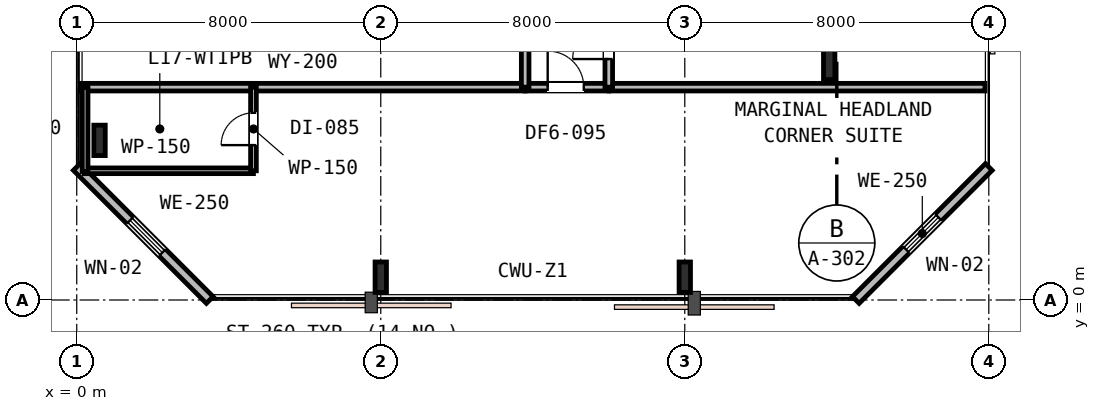
"""IFC4 building model, lengths in metres.
Left out: names, types, materials, properties, quantities, classifications, styles, units other than length and angle.
Written with IfcOpenShell. Run it as: python <this file> out.ifc"""

import sys

from ifc_helpers import new_model, si_unit, direction, frame, frame_2d, origin, origin_2d, place, context, subcontext, project, spatial, rectangle, i_section, extrude, element, fill, save


model = new_model("IFC4")
c1 = context("Model", 3, precision=1e-05, world=origin(), true_north=direction((0.0, 1.0)))
c2 = subcontext(c1, "Body", "Model", "MODEL_VIEW")
j1 = project(units=[si_unit("LENGTHUNIT", "METRE"), si_unit("PLANEANGLEUNIT", "RADIAN")], contexts=[c1])
p1 = place(None, origin())
s1 = spatial("IfcSite", under=j1, at=p1, CompositionType="ELEMENT")
p2 = place(p1, origin())
s2 = spatial("IfcBuilding", under=s1, at=p2, CompositionType="ELEMENT")
p3 = place(p2, frame((0.0, 0.0, 69.0)))
s3 = spatial("IfcBuildingStorey", under=s2, at=p3, CompositionType="ELEMENT", Elevation=69.0)
for number, where, z_axis, x_axis in (
    (1, (0.6, 4.2, 0.0), (0.0, 0.0, 1.0), (1.0, 0.0, 0.0)),
    (2, (8.0, 0.6, 0.0), (0.0, 0.0, 1.0), (1.0, 0.0, 0.0)),
    (3, (16.0, 0.6, 0.0), (0.0, 0.0, 1.0), (1.0, 0.0, 0.0)),
    (4, (19.8, 6.2, 0.0), (0.0, 0.0, 1.0), (1.0, 0.0, 0.0)),
):
    element("IfcColumn", number, at=place(p3, frame(where, z_axis=z_axis, x_axis=x_axis)), inside=s3, PredefinedType="COLUMN", context=c2, shape_type="SweptSolid", body=[
        extrude(i_section(OverallWidth=0.3, OverallDepth=0.8, WebThickness=0.018, FlangeThickness=0.033, FilletRadius=0.03, at=origin_2d()), origin(), (0.0, 0.0, 1.0), 3.6),
    ])
p4 = place(p3, frame((20.5, 0.0, 0.0), z_axis=(0.0, 0.0, 1.0), x_axis=(0.707106781187, 0.707106781187, 0.0)))
e5 = element("IfcWall", 5, at=p4, inside=s3, PredefinedType="STANDARD", context=c2, shape_type="SweptSolid", body=[
    extrude(rectangle(XDim=4.95, YDim=0.25, at=frame_2d((2.475, 0.0))), origin(), (0.0, 0.0, 1.0), 3.33),
])
p5 = place(p4, frame((1.875, 0.0, 0.85)))
e6 = element("IfcOpeningElement", 6, at=p5, cuts=e5, PredefinedType="OPENING", context=c2, shape_type="SweptSolid", body=[
    extrude(rectangle(XDim=1.2, YDim=1.6, at=frame_2d((0.6, 0.8))), frame((0.0, 0.135, 0.0), z_axis=(0.0, -1.0, 0.0), x_axis=(1.0, 0.0, 0.0)), (0.0, 0.0, 1.0), 0.27),
])
p6 = place(p3, frame((0.0, 3.5, 0.0), z_axis=(0.0, 0.0, 1.0), x_axis=(0.707106781187, -0.707106781187, 0.0)))
e7 = element("IfcWall", 7, at=p6, inside=s3, PredefinedType="STANDARD", context=c2, shape_type="SweptSolid", body=[
    extrude(rectangle(XDim=4.95, YDim=0.25, at=frame_2d((2.475, 0.0))), origin(), (0.0, 0.0, 1.0), 3.33),
])
p7 = place(p6, frame((1.985, 0.0, 0.85)))
e8 = element("IfcOpeningElement", 8, at=p7, cuts=e7, PredefinedType="OPENING", context=c2, shape_type="SweptSolid", body=[
    extrude(rectangle(XDim=1.2, YDim=1.6, at=frame_2d((0.6, 0.8))), frame((0.0, 0.135, 0.0), z_axis=(0.0, -1.0, 0.0), x_axis=(1.0, 0.0, 0.0)), (0.0, 0.0, 1.0), 0.27),
])
p8 = place(p3, frame((0.1, 5.6, 0.0), z_axis=(0.0, 0.0, 1.0), x_axis=(1.0, 0.0, 0.0)))
e9 = element("IfcWall", 9, at=p8, inside=s3, PredefinedType="PARTITIONING", context=c2, shape_type="SweptSolid", body=[
    extrude(rectangle(XDim=11.7, YDim=0.2, at=frame_2d((5.85, 0.0))), origin(), (0.0, 0.0, 1.0), 2.92),
])
p9 = place(p3, frame((14.0, 5.6, 0.0), z_axis=(0.0, 0.0, 1.0), x_axis=(1.0, 0.0, 0.0)))
e10 = element("IfcWall", 10, at=p9, inside=s3, PredefinedType="PARTITIONING", context=c2, shape_type="SweptSolid", body=[
    extrude(rectangle(XDim=9.9, YDim=0.2, at=frame_2d((4.95, 0.0))), origin(), (0.0, 0.0, 1.0), 2.83),
])
p10 = place(p3, frame((11.8, 5.6, 0.0), z_axis=(0.0, 0.0, 1.0), x_axis=(1.0, 0.0, 0.0)))
e11 = element("IfcWall", 11, at=p10, inside=s3, PredefinedType="PARTITIONING", context=c2, shape_type="SweptSolid", body=[
    extrude(rectangle(XDim=2.2, YDim=0.2, at=frame_2d((1.1, 0.0))), origin(), (0.0, 0.0, 1.0), 3.33),
])
p11 = place(p10, frame((0.593, 0.0, 0.0)))
e12 = element("IfcOpeningElement", 12, at=p11, cuts=e11, PredefinedType="OPENING", context=c2, shape_type="SweptSolid", body=[
    extrude(rectangle(XDim=0.95, YDim=2.15, at=frame_2d((0.475, 1.075))), frame((0.0, 0.11, 0.0), z_axis=(0.0, -1.0, 0.0), x_axis=(1.0, 0.0, 0.0)), (0.0, 0.0, 1.0), 0.22),
])
p12 = place(p3, frame((0.2, 3.4, 0.0), z_axis=(0.0, 0.0, 1.0), x_axis=(1.0, 0.0, 0.0)))
e13 = element("IfcWall", 13, at=p12, inside=s3, PredefinedType="PARTITIONING", context=c2, shape_type="SweptSolid", body=[
    extrude(rectangle(XDim=4.45, YDim=0.15, at=frame_2d((2.225, 0.0))), origin(), (0.0, 0.0, 1.0), 3.33),
])
p13 = place(p3, frame((4.65, 3.4, 0.0), z_axis=(0.0, 0.0, 1.0), x_axis=(0.0, 1.0, 0.0)))
e14 = element("IfcWall", 14, at=p13, inside=s3, PredefinedType="PARTITIONING", context=c2, shape_type="SweptSolid", body=[
    extrude(rectangle(XDim=2.2, YDim=0.15, at=frame_2d((1.1, 0.0))), origin(), (0.0, 0.0, 1.0), 3.33),
])
p14 = place(p13, frame((0.675, 0.0, 0.0)))
e15 = element("IfcOpeningElement", 15, at=p14, cuts=e14, PredefinedType="OPENING", context=c2, shape_type="SweptSolid", body=[
    extrude(rectangle(XDim=0.85, YDim=2.15, at=frame_2d((0.425, 1.075))), frame((0.0, 0.085, 0.0), z_axis=(0.0, -1.0, 0.0), x_axis=(1.0, 0.0, 0.0)), (0.0, 0.0, 1.0), 0.17),
])
p15 = place(p3, frame((0.22, 3.38, 0.0), z_axis=(0.0, 0.0, 1.0), x_axis=(0.0, 1.0, 0.0)))
e16 = element("IfcWall", 16, at=p15, inside=s3, PredefinedType="PARTITIONING", context=c2, shape_type="SweptSolid", body=[
    extrude(rectangle(XDim=2.22, YDim=0.15, at=frame_2d((1.11, 0.0))), origin(), (0.0, 0.0, 1.0), 2.92),
])
p16 = place(p3, frame((11.8, 5.6, 0.0), z_axis=(0.0, 0.0, 1.0), x_axis=(0.0, 1.0, 0.0)))
e17 = element("IfcWall", 17, at=p16, inside=s3, PredefinedType="PARTITIONING", context=c2, shape_type="SweptSolid", body=[
    extrude(rectangle(XDim=23.0, YDim=0.2, at=frame_2d((11.5, 0.0))), origin(), (0.0, 0.0, 1.0), 2.83),
])
p17 = place(p16, frame((1.2, 0.0, 0.0)))
e18 = element("IfcOpeningElement", 18, at=p17, cuts=e17, PredefinedType="OPENING", context=c2, shape_type="SweptSolid", body=[
    extrude(rectangle(XDim=0.95, YDim=2.15, at=frame_2d((0.475, 1.075))), frame((0.0, 0.11, 0.0), z_axis=(0.0, -1.0, 0.0), x_axis=(1.0, 0.0, 0.0)), (0.0, 0.0, 1.0), 0.22),
])
p18 = place(p16, frame((7.0, 0.0, 0.0)))
e19 = element("IfcOpeningElement", 19, at=p18, cuts=e17, PredefinedType="OPENING", context=c2, shape_type="SweptSolid", body=[
    extrude(rectangle(XDim=0.95, YDim=2.15, at=frame_2d((0.475, 1.075))), frame((0.0, 0.11, 0.0), z_axis=(0.0, -1.0, 0.0), x_axis=(1.0, 0.0, 0.0)), (0.0, 0.0, 1.0), 0.22),
])
p19 = place(p16, frame((12.8, 0.0, 0.0)))
e20 = element("IfcOpeningElement", 20, at=p19, cuts=e17, PredefinedType="OPENING", context=c2, shape_type="SweptSolid", body=[
    extrude(rectangle(XDim=0.95, YDim=2.15, at=frame_2d((0.475, 1.075))), frame((0.0, 0.11, 0.0), z_axis=(0.0, -1.0, 0.0), x_axis=(1.0, 0.0, 0.0)), (0.0, 0.0, 1.0), 0.22),
])
p20 = place(p16, frame((18.515, 0.0, 0.0)))
e21 = element("IfcOpeningElement", 21, at=p20, cuts=e17, PredefinedType="OPENING", context=c2, shape_type="SweptSolid", body=[
    extrude(rectangle(XDim=0.95, YDim=2.15, at=frame_2d((0.475, 1.075))), frame((0.0, 0.11, 0.0), z_axis=(0.0, -1.0, 0.0), x_axis=(1.0, 0.0, 0.0)), (0.0, 0.0, 1.0), 0.22),
])
p21 = place(p3, frame((14.0, 5.6, 0.0), z_axis=(0.0, 0.0, 1.0), x_axis=(0.0, 1.0, 0.0)))
e22 = element("IfcWall", 22, at=p21, inside=s3, PredefinedType="PARTITIONING", context=c2, shape_type="SweptSolid", body=[
    extrude(rectangle(XDim=23.0, YDim=0.2, at=frame_2d((11.5, 0.0))), origin(), (0.0, 0.0, 1.0), 2.83),
])
p22 = place(p21, frame((0.74, 0.0, 0.0)))
e23 = element("IfcOpeningElement", 23, at=p22, cuts=e22, PredefinedType="OPENING", context=c2, shape_type="SweptSolid", body=[
    extrude(rectangle(XDim=0.95, YDim=2.15, at=frame_2d((0.475, 1.075))), frame((0.0, 0.11, 0.0), z_axis=(0.0, -1.0, 0.0), x_axis=(1.0, 0.0, 0.0)), (0.0, 0.0, 1.0), 0.22),
])
p23 = place(p21, frame((6.271, 0.0, 0.0)))
e24 = element("IfcOpeningElement", 24, at=p23, cuts=e22, PredefinedType="OPENING", context=c2, shape_type="SweptSolid", body=[
    extrude(rectangle(XDim=0.95, YDim=2.15, at=frame_2d((0.475, 1.075))), frame((0.0, 0.11, 0.0), z_axis=(0.0, -1.0, 0.0), x_axis=(1.0, 0.0, 0.0)), (0.0, 0.0, 1.0), 0.22),
])
p24 = place(p21, frame((13.626, 0.0, 0.0)))
e25 = element("IfcOpeningElement", 25, at=p24, cuts=e22, PredefinedType="OPENING", context=c2, shape_type="SweptSolid", body=[
    extrude(rectangle(XDim=0.95, YDim=2.15, at=frame_2d((0.475, 1.075))), frame((0.0, 0.11, 0.0), z_axis=(0.0, -1.0, 0.0), x_axis=(1.0, 0.0, 0.0)), (0.0, 0.0, 1.0), 0.22),
])
p25 = place(p21, frame((20.393, 0.0, 0.0)))
e26 = element("IfcOpeningElement", 26, at=p25, cuts=e22, PredefinedType="OPENING", context=c2, shape_type="SweptSolid", body=[
    extrude(rectangle(XDim=0.95, YDim=2.15, at=frame_2d((0.475, 1.075))), frame((0.0, 0.11, 0.0), z_axis=(0.0, -1.0, 0.0), x_axis=(1.0, 0.0, 0.0)), (0.0, 0.0, 1.0), 0.22),
])
p26 = place(p5, origin())
e27 = element("IfcWindow", 27, at=p26, inside=s3, PartitioningType="SINGLE_PANEL", PredefinedType="WINDOW", context=c2, shape_type="SweptSolid", body=[
    extrude(rectangle(XDim=1.2, YDim=1.6, at=frame_2d((0.6, 0.8))), frame((0.0, 0.03, 0.0), z_axis=(0.0, -1.0, 0.0), x_axis=(1.0, 0.0, 0.0)), (0.0, 0.0, 1.0), 0.06),
])
fill(e6, e27)
p27 = place(p7, origin())
e28 = element("IfcWindow", 28, at=p27, inside=s3, PartitioningType="SINGLE_PANEL", PredefinedType="WINDOW", context=c2, shape_type="SweptSolid", body=[
    extrude(rectangle(XDim=1.2, YDim=1.6, at=frame_2d((0.6, 0.8))), frame((0.0, 0.03, 0.0), z_axis=(0.0, -1.0, 0.0), x_axis=(1.0, 0.0, 0.0)), (0.0, 0.0, 1.0), 0.06),
])
fill(e8, e28)
p28 = place(p11, origin())
e29 = element("IfcDoor", 29, at=p28, inside=s3, OperationType="SINGLE_SWING_LEFT", PredefinedType="DOOR", context=c2, shape_type="SweptSolid", body=[
    extrude(rectangle(XDim=0.95, YDim=2.15, at=frame_2d((0.475, 1.075))), frame((0.0, 0.025, 0.0), z_axis=(0.0, -1.0, 0.0), x_axis=(1.0, 0.0, 0.0)), (0.0, 0.0, 1.0), 0.05),
])
fill(e12, e29)
p29 = place(p14, origin())
e30 = element("IfcDoor", 30, at=p29, inside=s3, OperationType="SINGLE_SWING_LEFT", PredefinedType="DOOR", context=c2, shape_type="SweptSolid", body=[
    extrude(rectangle(XDim=0.85, YDim=2.15, at=frame_2d((0.425, 1.075))), frame((0.0, 0.025, 0.0), z_axis=(0.0, -1.0, 0.0), x_axis=(1.0, 0.0, 0.0)), (0.0, 0.0, 1.0), 0.05),
])
fill(e15, e30)
p30 = place(p22, origin())
e31 = element("IfcDoor", 31, at=p30, inside=s3, OperationType="SINGLE_SWING_LEFT", PredefinedType="DOOR", context=c2, shape_type="SweptSolid", body=[
    extrude(rectangle(XDim=0.95, YDim=2.15, at=frame_2d((0.475, 1.075))), frame((0.0, 0.025, 0.0), z_axis=(0.0, -1.0, 0.0), x_axis=(1.0, 0.0, 0.0)), (0.0, 0.0, 1.0), 0.05),
])
fill(e23, e31)
save(model, sys.argv[1])
